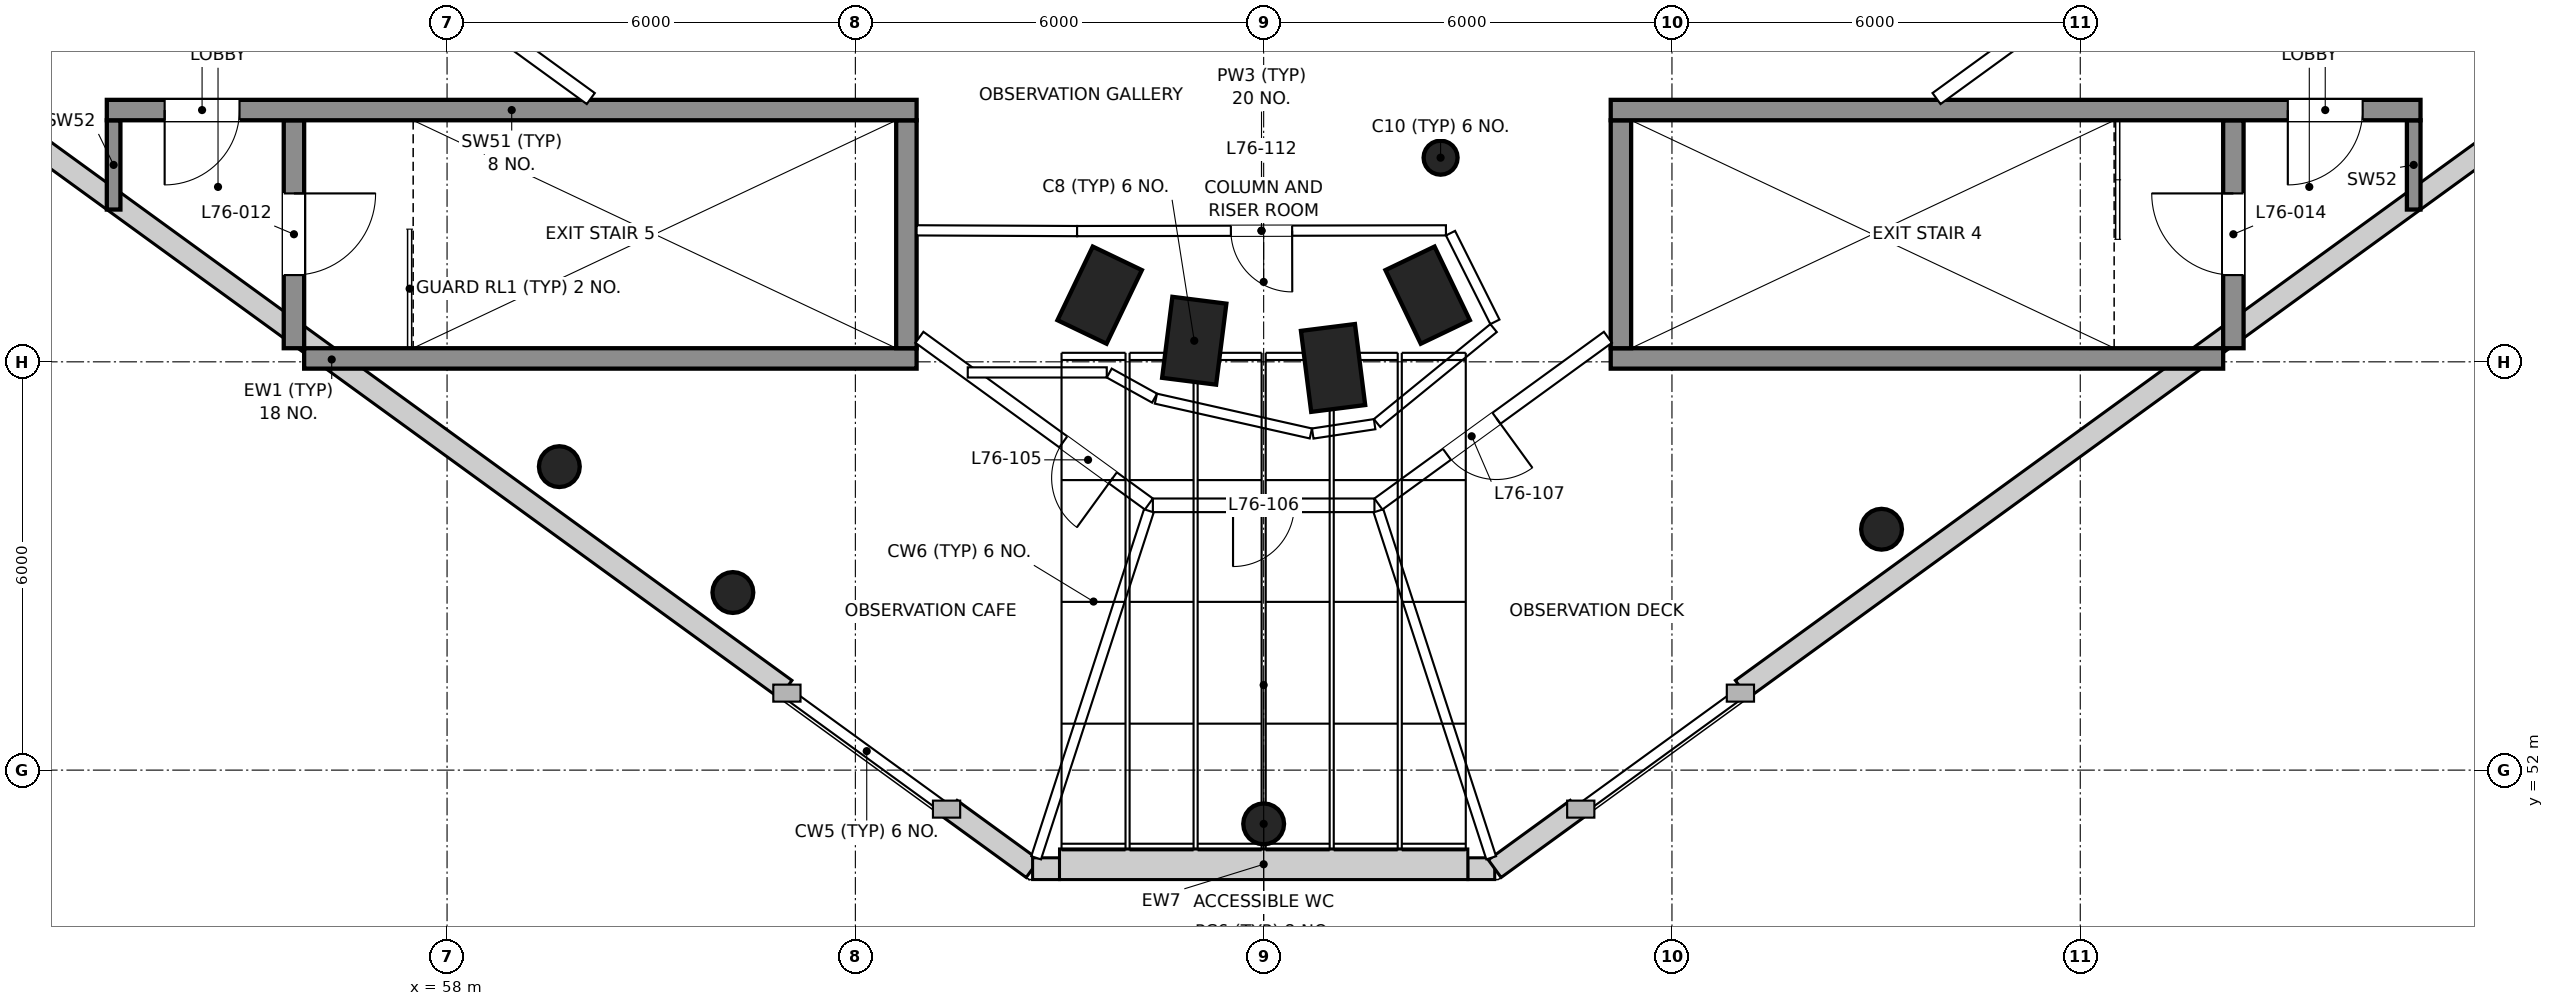
"""IFC4 building model, lengths in metres.
Left out: names, types, materials, properties, quantities, classifications, styles, units other than length and angle.
Written with IfcOpenShell. Run it as: python <this file> out.ifc"""

import sys

from ifc_helpers import new_model, si_unit, direction, frame, frame_2d, origin, origin_2d, place, context, subcontext, project, spatial, polyline, rectangle, circle, outline, extrude, element, fill, save


model = new_model("IFC4")
c1 = context("Model", 3, precision=1e-05, world=origin(), true_north=direction((0.0, 1.0)))
c2 = subcontext(c1, "Body", "Model", "MODEL_VIEW")
j1 = project(units=[si_unit("LENGTHUNIT", "METRE"), si_unit("PLANEANGLEUNIT", "RADIAN")], contexts=[c1])
p1 = place(None, origin())
s1 = spatial("IfcSite", under=j1, at=p1, CompositionType="ELEMENT")
p2 = place(p1, origin())
s2 = spatial("IfcBuilding", under=s1, at=p2, CompositionType="ELEMENT")
p3 = place(p2, frame((0.0, 0.0, 321.7)))
s3 = spatial("IfcBuildingStorey", under=s2, at=p3, CompositionType="ELEMENT", Elevation=321.7)
for number, where, z_axis, x_axis in (
    (1, (67.59, 58.98, 0.0), (0.0, 0.0, 1.0), (-0.902, 0.432, 0.0)),
    (2, (68.98, 58.31, 0.0), (0.0, 0.0, 1.0), (-0.992, 0.126, 0.0)),
    (3, (71.02, 57.91, 0.0), (0.0, 0.0, 1.0), (-0.992, -0.126, 0.0)),
    (4, (72.41, 58.98, 0.0), (0.0, 0.0, 1.0), (-0.902, -0.432, 0.0)),
):
    element("IfcColumn", number, at=place(p3, frame(where, z_axis=z_axis, x_axis=x_axis)), inside=s3, PredefinedType="COLUMN", context=c2, shape_type="SweptSolid", body=[
        extrude(rectangle(XDim=0.8, YDim=1.2, at=origin_2d()), origin(), (0.0, 0.0, 1.0), 7.0),
    ])
p4 = place(p3, frame((72.6, 61.0, 0.0), z_axis=(0.0, 0.0, 1.0), x_axis=(1.0, 0.0, 0.0)))
e5 = element("IfcColumn", 5, at=p4, inside=s3, PredefinedType="COLUMN", context=c2, shape_type="SweptSolid", body=[
    extrude(circle(Radius=0.25, at=origin_2d()), origin(), (0.0, 0.0, 1.0), 7.0),
])
for number, where, z_axis, x_axis in (
    (6, (59.65, 56.46, 0.0), (0.0, 0.0, 1.0), (1.0, 0.0, 0.0)),
    (7, (62.2, 54.61, 0.0), (0.0, 0.0, 1.0), (1.0, 0.0, 0.0)),
    (8, (70.0, 51.21, 0.0), (0.0, 0.0, 1.0), (1.0, 0.0, 0.0)),
    (9, (79.08, 55.54, 0.0), (0.0, 0.0, 1.0), (1.0, 0.0, 0.0)),
):
    element("IfcColumn", number, at=place(p3, frame(where, z_axis=z_axis, x_axis=x_axis)), inside=s3, PredefinedType="COLUMN", context=c2, shape_type="SweptSolid", body=[
        extrude(circle(Radius=0.3, at=origin_2d()), origin(), (0.0, 0.0, 1.0), 7.0),
    ])
p5 = place(p3, frame((49.636, 62.88, 0.0), z_axis=(0.0, 0.0, 1.0), x_axis=(0.809009420969, -0.587795676051, 0.0)))
e10 = element("IfcWall", 10, at=p5, inside=s3, PredefinedType="SOLIDWALL", context=c2, shape_type="SweptSolid", body=[
    extrude(outline(polyline([(0.0, 0.0), (16.487, 0.0), (16.487, 9.427), (15.364, 10.012), (15.362, 6.7), (0.0, 6.7), (0.0, 0.0)])), frame((0.0, 0.16, 0.0), z_axis=(0.0, -1.0, 0.0), x_axis=(1.0, 0.0, 0.0)), (0.0, 0.0, 1.0), 0.32),
])
p6 = place(p3, frame((65.401, 51.426, 0.0), z_axis=(0.0, 0.0, 1.0), x_axis=(0.809026994241, -0.587771488411, 0.0)))
e11 = element("IfcWall", 11, at=p6, inside=s3, PredefinedType="SOLIDWALL", context=c2, shape_type="SweptSolid", body=[
    extrude(outline(polyline([(0.0, 0.0), (1.488, 0.0), (1.487, 7.092), (0.0, 7.866), (0.0, 0.0)])), frame((0.0, 0.16, 0.0), z_axis=(0.0, -1.0, 0.0), x_axis=(1.0, 0.0, 0.0)), (0.0, 0.0, 1.0), 0.32),
])
for number, where, z_axis, x_axis in (
    (12, (66.604, 50.552, 0.0), (0.0, 0.0, 1.0), (1.0, 0.0, 0.0)),
    (13, (73.0, 50.552, 0.0), (0.0, 0.0, 1.0), (1.0, 0.0, 0.0)),
):
    element("IfcWall", number, at=place(p3, frame(where, z_axis=z_axis, x_axis=x_axis)), inside=s3, PredefinedType="SOLIDWALL", context=c2, shape_type="SweptSolid", body=[
        extrude(outline(polyline([(0.0, 0.0), (0.396, 0.0), (0.396, 7.092), (0.0, 7.092), (0.0, 0.0)])), frame((0.0, 0.16, 0.0), z_axis=(0.0, -1.0, 0.0), x_axis=(1.0, 0.0, 0.0)), (0.0, 0.0, 1.0), 0.32),
    ])
p7 = place(p3, frame((73.396, 50.552, 0.0), z_axis=(0.0, 0.0, 1.0), x_axis=(0.809026994241, 0.587771488411, 0.0)))
e14 = element("IfcWall", 14, at=p7, inside=s3, PredefinedType="SOLIDWALL", context=c2, shape_type="SweptSolid", body=[
    extrude(outline(polyline([(0.0, 0.0), (1.488, 0.0), (1.487, 7.866), (0.0, 7.092), (0.0, 0.0)])), frame((0.0, 0.16, 0.0), z_axis=(0.0, -1.0, 0.0), x_axis=(1.0, 0.0, 0.0)), (0.0, 0.0, 1.0), 0.32),
])
p8 = place(p3, frame((77.026, 53.189, 0.0), z_axis=(0.0, 0.0, 1.0), x_axis=(0.809009420969, 0.587795676051, 0.0)))
e15 = element("IfcWall", 15, at=p8, inside=s3, PredefinedType="SOLIDWALL", context=c2, shape_type="SweptSolid", body=[
    extrude(outline(polyline([(0.0, 0.0), (16.487, 0.0), (16.485, 6.7), (1.126, 6.7), (1.124, 10.012), (0.0, 9.427), (0.0, 0.0)])), frame((0.0, 0.16, 0.0), z_axis=(0.0, -1.0, 0.0), x_axis=(1.0, 0.0, 0.0)), (0.0, 0.0, 1.0), 0.32),
])
p9 = place(p3, frame((67.0, 50.616, 0.0), z_axis=(0.0, 0.0, 1.0), x_axis=(1.0, 0.0, 0.0)))
e16 = element("IfcWall", 16, at=p9, inside=s3, PredefinedType="SOLIDWALL", context=c2, shape_type="SweptSolid", body=[
    extrude(rectangle(XDim=6.0, YDim=0.45, at=frame_2d((3.0, 0.0))), origin(), (0.0, 0.0, 1.0), 7.299),
])
for number, where, z_axis, x_axis in (
    (17, (55.9, 58.05, 0.0), (0.0, 0.0, 1.0), (1.0, 0.0, 0.0)),
    (18, (75.1, 58.05, 0.0), (0.0, 0.0, 1.0), (1.0, 0.0, 0.0)),
):
    element("IfcWall", number, at=place(p3, frame(where, z_axis=z_axis, x_axis=x_axis)), inside=s3, PredefinedType="SHEAR", context=c2, shape_type="SweptSolid", body=[
        extrude(rectangle(XDim=9.0, YDim=0.3, at=frame_2d((4.5, 0.0))), origin(), (0.0, 0.0, 1.0), 7.0),
    ])
p10 = place(p3, frame((55.75, 58.2, 0.0), z_axis=(0.0, 0.0, 1.0), x_axis=(0.0, 1.0, 0.0)))
e19 = element("IfcWall", 19, at=p10, inside=s3, PredefinedType="SHEAR", context=c2, shape_type="SweptSolid", body=[
    extrude(rectangle(XDim=3.35, YDim=0.3, at=frame_2d((1.675, 0.0))), origin(), (0.0, 0.0, 1.0), 7.0),
])
p11 = place(p10, frame((1.075, 0.0, 0.0)))
e20 = element("IfcOpeningElement", 20, at=p11, cuts=e19, PredefinedType="OPENING", context=c2, shape_type="SweptSolid", body=[
    extrude(rectangle(XDim=1.2, YDim=2.1, at=frame_2d((0.6, 1.05))), frame((0.0, 0.16, 0.0), z_axis=(0.0, -1.0, 0.0), x_axis=(1.0, 0.0, 0.0)), (0.0, 0.0, 1.0), 0.32),
])
for number, where, z_axis, x_axis in (
    (21, (64.75, 58.2, 0.0), (0.0, 0.0, 1.0), (0.0, 1.0, 0.0)),
    (22, (75.25, 58.2, 0.0), (0.0, 0.0, 1.0), (0.0, 1.0, 0.0)),
):
    element("IfcWall", number, at=place(p3, frame(where, z_axis=z_axis, x_axis=x_axis)), inside=s3, PredefinedType="SHEAR", context=c2, shape_type="SweptSolid", body=[
        extrude(rectangle(XDim=3.35, YDim=0.3, at=frame_2d((1.675, 0.0))), origin(), (0.0, 0.0, 1.0), 7.0),
    ])
p12 = place(p3, frame((84.25, 58.2, 0.0), z_axis=(0.0, 0.0, 1.0), x_axis=(0.0, 1.0, 0.0)))
e23 = element("IfcWall", 23, at=p12, inside=s3, PredefinedType="SHEAR", context=c2, shape_type="SweptSolid", body=[
    extrude(rectangle(XDim=3.35, YDim=0.3, at=frame_2d((1.675, 0.0))), origin(), (0.0, 0.0, 1.0), 7.0),
])
p13 = place(p12, frame((1.075, 0.0, 0.0)))
e24 = element("IfcOpeningElement", 24, at=p13, cuts=e23, PredefinedType="OPENING", context=c2, shape_type="SweptSolid", body=[
    extrude(rectangle(XDim=1.2, YDim=2.1, at=frame_2d((0.6, 1.05))), frame((0.0, 0.16, 0.0), z_axis=(0.0, -1.0, 0.0), x_axis=(1.0, 0.0, 0.0)), (0.0, 0.0, 1.0), 0.32),
])
for number, where, z_axis, x_axis in (
    (25, (53.1, 60.238, 0.0), (0.0, 0.0, 1.0), (0.0, 1.0, 0.0)),
    (26, (86.9, 60.238, 0.0), (0.0, 0.0, 1.0), (0.0, 1.0, 0.0)),
):
    element("IfcWall", number, at=place(p3, frame(where, z_axis=z_axis, x_axis=x_axis)), inside=s3, PredefinedType="SHEAR", context=c2, shape_type="SweptSolid", body=[
        extrude(rectangle(XDim=1.312, YDim=0.2, at=frame_2d((0.656, 0.0))), origin(), (0.0, 0.0, 1.0), 7.0),
    ])
p14 = place(p3, frame((53.0, 61.7, 0.0), z_axis=(0.0, 0.0, 1.0), x_axis=(1.0, 0.0, 0.0)))
e27 = element("IfcWall", 27, at=p14, inside=s3, PredefinedType="SHEAR", context=c2, shape_type="SweptSolid", body=[
    extrude(rectangle(XDim=11.9, YDim=0.3, at=frame_2d((5.95, 0.0))), origin(), (0.0, 0.0, 1.0), 7.0),
])
p15 = place(p14, frame((0.85, 0.0, 0.0)))
e28 = element("IfcOpeningElement", 28, at=p15, cuts=e27, PredefinedType="OPENING", context=c2, shape_type="SweptSolid", body=[
    extrude(rectangle(XDim=1.1, YDim=2.1, at=frame_2d((0.55, 1.05))), frame((0.0, 0.16, 0.0), z_axis=(0.0, -1.0, 0.0), x_axis=(1.0, 0.0, 0.0)), (0.0, 0.0, 1.0), 0.32),
])
p16 = place(p3, frame((75.1, 61.7, 0.0), z_axis=(0.0, 0.0, 1.0), x_axis=(1.0, 0.0, 0.0)))
e29 = element("IfcWall", 29, at=p16, inside=s3, PredefinedType="SHEAR", context=c2, shape_type="SweptSolid", body=[
    extrude(rectangle(XDim=11.9, YDim=0.3, at=frame_2d((5.95, 0.0))), origin(), (0.0, 0.0, 1.0), 7.0),
])
p17 = place(p16, frame((9.95, 0.0, 0.0)))
e30 = element("IfcOpeningElement", 30, at=p17, cuts=e29, PredefinedType="OPENING", context=c2, shape_type="SweptSolid", body=[
    extrude(rectangle(XDim=1.1, YDim=2.1, at=frame_2d((0.55, 1.05))), frame((0.0, 0.16, 0.0), z_axis=(0.0, -1.0, 0.0), x_axis=(1.0, 0.0, 0.0)), (0.0, 0.0, 1.0), 0.32),
])
p18 = place(p3, frame((82.615, 63.85, 0.0), z_axis=(0.0, 0.0, 1.0), x_axis=(-0.809017922832, -0.587783974379, 0.0)))
e31 = element("IfcWall", 31, at=p18, inside=s3, PredefinedType="PARTITIONING", context=c2, shape_type="SweptSolid", body=[
    extrude(rectangle(XDim=3.37, YDim=0.2, at=frame_2d((1.685, 0.0))), origin(), (0.0, 0.0, 1.0), 6.7),
])
p19 = place(p3, frame((75.059, 58.361, 0.0), z_axis=(0.0, 0.0, 1.0), x_axis=(-0.809017144694, -0.587785045396, 0.0)))
e32 = element("IfcWall", 32, at=p19, inside=s3, PredefinedType="PARTITIONING", context=c2, shape_type="SweptSolid", body=[
    extrude(rectangle(XDim=4.168, YDim=0.2, at=frame_2d((2.084, 0.0))), origin(), (0.0, 0.0, 1.0), 6.7),
])
p20 = place(p19, frame((2.025, 0.0, 0.0)))
e33 = element("IfcOpeningElement", 33, at=p20, cuts=e32, PredefinedType="OPENING", context=c2, shape_type="SweptSolid", body=[
    extrude(rectangle(XDim=0.9, YDim=2.1, at=frame_2d((0.45, 1.05))), frame((0.0, 0.11, 0.0), z_axis=(0.0, -1.0, 0.0), x_axis=(1.0, 0.0, 0.0)), (0.0, 0.0, 1.0), 0.22),
])
p21 = place(p3, frame((71.628, 55.892, 0.0), z_axis=(0.0, 0.0, 1.0), x_axis=(-1.0, 0.0, 0.0)))
e34 = element("IfcWall", 34, at=p21, inside=s3, PredefinedType="PARTITIONING", context=c2, shape_type="SweptSolid", body=[
    extrude(rectangle(XDim=3.256, YDim=0.2, at=frame_2d((1.628, 0.0))), origin(), (0.0, 0.0, 1.0), 6.7),
])
p22 = place(p21, frame((1.178, 0.0, 0.0)))
e35 = element("IfcOpeningElement", 35, at=p22, cuts=e34, PredefinedType="OPENING", context=c2, shape_type="SweptSolid", body=[
    extrude(rectangle(XDim=0.9, YDim=2.1, at=frame_2d((0.45, 1.05))), frame((0.0, 0.11, 0.0), z_axis=(0.0, -1.0, 0.0), x_axis=(1.0, 0.0, 0.0)), (0.0, 0.0, 1.0), 0.22),
])
p23 = place(p3, frame((68.313, 55.911, 0.0), z_axis=(0.0, 0.0, 1.0), x_axis=(-0.809017144694, 0.587785045396, 0.0)))
e36 = element("IfcWall", 36, at=p23, inside=s3, PredefinedType="PARTITIONING", context=c2, shape_type="SweptSolid", body=[
    extrude(rectangle(XDim=4.168, YDim=0.2, at=frame_2d((2.084, 0.0))), origin(), (0.0, 0.0, 1.0), 6.7),
])
p24 = place(p23, frame((0.654, 0.0, 0.0)))
e37 = element("IfcOpeningElement", 37, at=p24, cuts=e36, PredefinedType="OPENING", context=c2, shape_type="SweptSolid", body=[
    extrude(rectangle(XDim=0.9, YDim=2.1, at=frame_2d((0.45, 1.05))), frame((0.0, 0.11, 0.0), z_axis=(0.0, -1.0, 0.0), x_axis=(1.0, 0.0, 0.0)), (0.0, 0.0, 1.0), 0.22),
])
p25 = place(p3, frame((60.112, 61.869, 0.0), z_axis=(0.0, 0.0, 1.0), x_axis=(-0.809017922832, 0.587783974379, 0.0)))
e38 = element("IfcWall", 38, at=p25, inside=s3, PredefinedType="PARTITIONING", context=c2, shape_type="SweptSolid", body=[
    extrude(rectangle(XDim=3.37, YDim=0.2, at=frame_2d((1.685, 0.0))), origin(), (0.0, 0.0, 1.0), 6.7),
])
for number, where, z_axis, x_axis in (
    (39, (66.656, 50.711, 0.0), (0.0, 0.0, 1.0), (0.309, 0.951, 0.0)),
    (40, (73.344, 50.711, 0.0), (0.0, 0.0, 1.0), (-0.309, 0.951, 0.0)),
):
    element("IfcWall", number, at=place(p3, frame(where, z_axis=z_axis, x_axis=x_axis)), inside=s3, PredefinedType="PARTITIONING", context=c2, shape_type="SweptSolid", body=[
        extrude(rectangle(XDim=5.362, YDim=0.15, at=frame_2d((2.681, 0.0))), origin(), (0.0, 0.0, 1.0), 6.7),
    ])
p26 = place(p3, frame((68.397, 57.466, 0.0), z_axis=(0.0, 0.0, 1.0), x_axis=(-0.874987806076, 0.484144956825, 0.0)))
e41 = element("IfcWall", 41, at=p26, inside=s3, PredefinedType="PARTITIONING", context=c2, shape_type="SweptSolid", body=[
    extrude(rectangle(XDim=0.761, YDim=0.15, at=frame_2d((0.381, 0.0))), origin(), (0.0, 0.0, 1.0), 6.7),
])
p27 = place(p3, frame((67.695, 57.844, 0.0), z_axis=(0.0, 0.0, 1.0), x_axis=(-1.0, 0.0, 0.0)))
e42 = element("IfcWall", 42, at=p27, inside=s3, PredefinedType="PARTITIONING", context=c2, shape_type="SweptSolid", body=[
    extrude(rectangle(XDim=2.043, YDim=0.15, at=frame_2d((1.021, 0.0))), origin(), (0.0, 0.0, 1.0), 6.7),
])
p28 = place(p3, frame((64.9, 59.932, 0.0), z_axis=(0.0, 0.0, 1.0), x_axis=(0.999989145407, -0.004659299187, 0.0)))
e43 = element("IfcWall", 43, at=p28, inside=s3, PredefinedType="PARTITIONING", context=c2, shape_type="SweptSolid", body=[
    extrude(rectangle(XDim=2.358, YDim=0.15, at=frame_2d((1.179, 0.0))), origin(), (0.0, 0.0, 1.0), 6.7),
])
p29 = place(p3, frame((67.258, 59.921, 0.0), z_axis=(0.0, 0.0, 1.0), x_axis=(0.999997945957, 0.002026840265, 0.0)))
e44 = element("IfcWall", 44, at=p29, inside=s3, PredefinedType="PARTITIONING", context=c2, shape_type="SweptSolid", body=[
    extrude(rectangle(XDim=5.42, YDim=0.15, at=frame_2d((2.71, 0.0))), origin(), (0.0, 0.0, 1.0), 6.7),
])
p30 = place(p29, frame((2.26, 0.0, 0.0)))
e45 = element("IfcOpeningElement", 45, at=p30, cuts=e44, PredefinedType="OPENING", context=c2, shape_type="SweptSolid", body=[
    extrude(rectangle(XDim=0.9, YDim=2.1, at=frame_2d((0.45, 1.05))), frame((0.0, 0.085, 0.0), z_axis=(0.0, -1.0, 0.0), x_axis=(1.0, 0.0, 0.0)), (0.0, 0.0, 1.0), 0.17),
])
p31 = place(p3, frame((72.746, 59.891, 0.0), z_axis=(0.0, 0.0, 1.0), x_axis=(0.447615600259, -0.894226075668, 0.0)))
e46 = element("IfcWall", 46, at=p31, inside=s3, PredefinedType="PARTITIONING", context=c2, shape_type="SweptSolid", body=[
    extrude(rectangle(XDim=1.457, YDim=0.15, at=frame_2d((0.729, 0.0))), origin(), (0.0, 0.0, 1.0), 6.7),
])
p32 = place(p3, frame((73.378, 58.496, 0.0), z_axis=(0.0, 0.0, 1.0), x_axis=(-0.774892088392, -0.632093546358, 0.0)))
e47 = element("IfcWall", 47, at=p32, inside=s3, PredefinedType="PARTITIONING", context=c2, shape_type="SweptSolid", body=[
    extrude(rectangle(XDim=2.209, YDim=0.15, at=frame_2d((1.104, 0.0))), origin(), (0.0, 0.0, 1.0), 6.7),
])
p33 = place(p3, frame((71.631, 57.084, 0.0), z_axis=(0.0, 0.0, 1.0), x_axis=(-0.988809432603, -0.14918413453, 0.0)))
e48 = element("IfcWall", 48, at=p33, inside=s3, PredefinedType="PARTITIONING", context=c2, shape_type="SweptSolid", body=[
    extrude(rectangle(XDim=0.92, YDim=0.15, at=frame_2d((0.46, 0.0))), origin(), (0.0, 0.0, 1.0), 6.7),
])
p34 = place(p3, frame((70.694, 56.948, 0.0), z_axis=(0.0, 0.0, 1.0), x_axis=(-0.975702102624, 0.219101362241, 0.0)))
e49 = element("IfcWall", 49, at=p34, inside=s3, PredefinedType="PARTITIONING", context=c2, shape_type="SweptSolid", body=[
    extrude(rectangle(XDim=2.333, YDim=0.15, at=frame_2d((1.167, 0.0))), origin(), (0.0, 0.0, 1.0), 6.7),
])
p35 = place(p15, frame((1.1, 0.0, 0.0), z_axis=(0.0, 0.0, 1.0), x_axis=(-1.0, 0.0, 0.0)))
e50 = element("IfcDoor", 50, at=p35, inside=s3, OperationType="SINGLE_SWING_RIGHT", PredefinedType="DOOR", context=c2, shape_type="SweptSolid", body=[
    extrude(rectangle(XDim=1.1, YDim=2.1, at=frame_2d((0.55, 1.05))), frame((0.0, 0.025, 0.0), z_axis=(0.0, -1.0, 0.0), x_axis=(1.0, 0.0, 0.0)), (0.0, 0.0, 1.0), 0.05),
])
fill(e28, e50)
p36 = place(p11, frame((1.2, 0.0, 0.0), z_axis=(0.0, 0.0, 1.0), x_axis=(-1.0, 0.0, 0.0)))
e51 = element("IfcDoor", 51, at=p36, inside=s3, OperationType="SINGLE_SWING_LEFT", PredefinedType="DOOR", context=c2, shape_type="SweptSolid", body=[
    extrude(rectangle(XDim=1.2, YDim=2.1, at=frame_2d((0.6, 1.05))), frame((0.0, 0.025, 0.0), z_axis=(0.0, -1.0, 0.0), x_axis=(1.0, 0.0, 0.0)), (0.0, 0.0, 1.0), 0.05),
])
fill(e20, e51)
p37 = place(p17, frame((1.1, 0.0, 0.0), z_axis=(0.0, 0.0, 1.0), x_axis=(-1.0, 0.0, 0.0)))
e52 = element("IfcDoor", 52, at=p37, inside=s3, OperationType="SINGLE_SWING_RIGHT", PredefinedType="DOOR", context=c2, shape_type="SweptSolid", body=[
    extrude(rectangle(XDim=1.1, YDim=2.1, at=frame_2d((0.55, 1.05))), frame((0.0, 0.025, 0.0), z_axis=(0.0, -1.0, 0.0), x_axis=(1.0, 0.0, 0.0)), (0.0, 0.0, 1.0), 0.05),
])
fill(e30, e52)
p38 = place(p13, origin())
e53 = element("IfcDoor", 53, at=p38, inside=s3, OperationType="SINGLE_SWING_RIGHT", PredefinedType="DOOR", context=c2, shape_type="SweptSolid", body=[
    extrude(rectangle(XDim=1.2, YDim=2.1, at=frame_2d((0.6, 1.05))), frame((0.0, 0.025, 0.0), z_axis=(0.0, -1.0, 0.0), x_axis=(1.0, 0.0, 0.0)), (0.0, 0.0, 1.0), 0.05),
])
fill(e24, e53)
p39 = place(p24, origin())
e54 = element("IfcDoor", 54, at=p39, inside=s3, OperationType="SINGLE_SWING_LEFT", PredefinedType="DOOR", context=c2, shape_type="SweptSolid", body=[
    extrude(rectangle(XDim=0.9, YDim=2.1, at=frame_2d((0.45, 1.05))), frame((0.0, 0.025, 0.0), z_axis=(0.0, -1.0, 0.0), x_axis=(1.0, 0.0, 0.0)), (0.0, 0.0, 1.0), 0.05),
])
fill(e37, e54)
p40 = place(p22, origin())
e55 = element("IfcDoor", 55, at=p40, inside=s3, OperationType="SINGLE_SWING_RIGHT", PredefinedType="DOOR", context=c2, shape_type="SweptSolid", body=[
    extrude(rectangle(XDim=0.9, YDim=2.1, at=frame_2d((0.45, 1.05))), frame((0.0, 0.025, 0.0), z_axis=(0.0, -1.0, 0.0), x_axis=(1.0, 0.0, 0.0)), (0.0, 0.0, 1.0), 0.05),
])
fill(e35, e55)
p41 = place(p20, origin())
e56 = element("IfcDoor", 56, at=p41, inside=s3, OperationType="SINGLE_SWING_LEFT", PredefinedType="DOOR", context=c2, shape_type="SweptSolid", body=[
    extrude(rectangle(XDim=0.9, YDim=2.1, at=frame_2d((0.45, 1.05))), frame((0.0, 0.025, 0.0), z_axis=(0.0, -1.0, 0.0), x_axis=(1.0, 0.0, 0.0)), (0.0, 0.0, 1.0), 0.05),
])
fill(e33, e56)
p42 = place(p30, frame((0.9, 0.0, 0.0), z_axis=(0.0, 0.0, 1.0), x_axis=(-1.0, 0.0, 0.0)))
e57 = element("IfcDoor", 57, at=p42, inside=s3, OperationType="SINGLE_SWING_LEFT", PredefinedType="DOOR", context=c2, shape_type="SweptSolid", body=[
    extrude(rectangle(XDim=0.9, YDim=2.1, at=frame_2d((0.45, 1.05))), frame((0.0, 0.025, 0.0), z_axis=(0.0, -1.0, 0.0), x_axis=(1.0, 0.0, 0.0)), (0.0, 0.0, 1.0), 0.05),
])
fill(e45, e57)
save(model, sys.argv[1])
